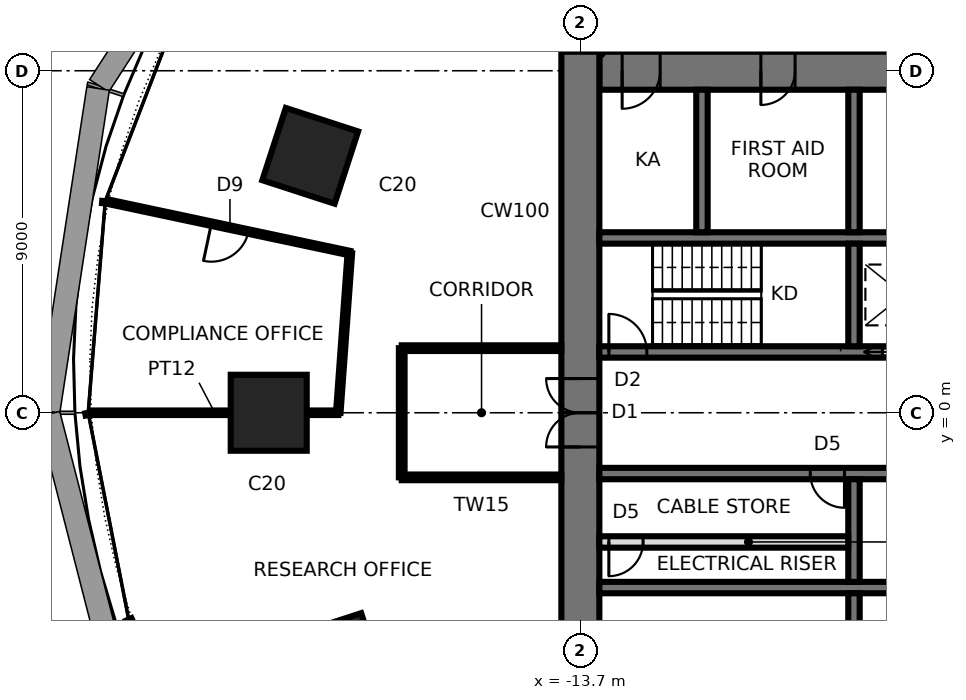
"""IFC4 building model, lengths in metres.
Left out: names, types, materials, properties, quantities, classifications, styles, units other than length and angle.
Written with IfcOpenShell. Run it as: python <this file> out.ifc"""

import sys

from ifc_helpers import new_model, si_unit, direction, frame, frame_2d, origin, origin_2d, place, context, subcontext, project, spatial, rectangle, extrude, element, fill, save


model = new_model("IFC4")
c1 = context("Model", 3, precision=1e-05, world=origin(), true_north=direction((0.0, 1.0)))
c2 = subcontext(c1, "Body", "Model", "MODEL_VIEW")
j1 = project(units=[si_unit("LENGTHUNIT", "METRE"), si_unit("PLANEANGLEUNIT", "RADIAN")], contexts=[c1])
p1 = place(None, origin())
s1 = spatial("IfcSite", under=j1, at=p1, CompositionType="ELEMENT")
p2 = place(p1, origin())
s2 = spatial("IfcBuilding", under=s1, at=p2, CompositionType="ELEMENT")
p3 = place(p2, frame((0.0, 0.0, 57.4)))
s3 = spatial("IfcBuildingStorey", under=s2, at=p3, CompositionType="ELEMENT", Elevation=57.4)
for number, where, z_axis, x_axis in (
    (1, (-20.808, 6.761, 0.0), (0.0, 0.0, 1.0), (-0.951, 0.309, 0.0)),
    (2, (-21.9, 0.0, 0.0), (0.0, 0.0, 1.0), (-1.0, 0.0, 0.0)),
    (3, (-20.109, -6.534, 0.0), (0.0, 0.0, 1.0), (-0.951, -0.309, 0.0)),
):
    element("IfcColumn", number, at=place(p3, frame(where, z_axis=z_axis, x_axis=x_axis)), inside=s3, PredefinedType="COLUMN", context=c2, shape_type="SweptSolid", body=[
        extrude(rectangle(XDim=2.0, YDim=2.0, at=origin_2d()), origin(), (0.0, 0.0, 1.0), 4.2),
    ])
p4 = place(p3, frame((13.2, 9.0, 0.0), z_axis=(0.0, 0.0, 1.0), x_axis=(-1.0, 0.0, 0.0)))
e4 = element("IfcWall", 4, at=p4, inside=s3, PredefinedType="SHEAR", context=c2, shape_type="SweptSolid", body=[
    extrude(rectangle(XDim=26.4, YDim=1.0, at=frame_2d((13.2, 0.0))), origin(), (0.0, 0.0, 1.0), 4.2),
])
p5 = place(p4, frame((2.65, 0.0, 0.0)))
e5 = element("IfcOpeningElement", 5, at=p5, cuts=e4, PredefinedType="OPENING", context=c2, shape_type="SweptSolid", body=[
    extrude(rectangle(XDim=0.9, YDim=2.1, at=frame_2d((0.45, 1.05))), frame((0.0, 0.51, 0.0), z_axis=(0.0, -1.0, 0.0), x_axis=(1.0, 0.0, 0.0)), (0.0, 0.0, 1.0), 1.02),
])
p6 = place(p4, frame((9.5, 0.0, 0.0)))
e6 = element("IfcOpeningElement", 6, at=p6, cuts=e4, PredefinedType="OPENING", context=c2, shape_type="SweptSolid", body=[
    extrude(rectangle(XDim=0.9, YDim=2.1, at=frame_2d((0.45, 1.05))), frame((0.0, 0.51, 0.0), z_axis=(0.0, -1.0, 0.0), x_axis=(1.0, 0.0, 0.0)), (0.0, 0.0, 1.0), 1.02),
])
p7 = place(p4, frame((16.0, 0.0, 0.0)))
e7 = element("IfcOpeningElement", 7, at=p7, cuts=e4, PredefinedType="OPENING", context=c2, shape_type="SweptSolid", body=[
    extrude(rectangle(XDim=0.9, YDim=2.1, at=frame_2d((0.45, 1.05))), frame((0.0, 0.51, 0.0), z_axis=(0.0, -1.0, 0.0), x_axis=(1.0, 0.0, 0.0)), (0.0, 0.0, 1.0), 1.02),
])
p8 = place(p4, frame((21.25, 0.0, 0.0)))
e8 = element("IfcOpeningElement", 8, at=p8, cuts=e4, PredefinedType="OPENING", context=c2, shape_type="SweptSolid", body=[
    extrude(rectangle(XDim=0.9, YDim=2.1, at=frame_2d((0.45, 1.05))), frame((0.0, 0.51, 0.0), z_axis=(0.0, -1.0, 0.0), x_axis=(1.0, 0.0, 0.0)), (0.0, 0.0, 1.0), 1.02),
])
p9 = place(p4, frame((24.8, 0.0, 0.0)))
e9 = element("IfcOpeningElement", 9, at=p9, cuts=e4, PredefinedType="OPENING", context=c2, shape_type="SweptSolid", body=[
    extrude(rectangle(XDim=1.0, YDim=2.1, at=frame_2d((0.5, 1.05))), frame((0.0, 0.51, 0.0), z_axis=(0.0, -1.0, 0.0), x_axis=(1.0, 0.0, 0.0)), (0.0, 0.0, 1.0), 1.02),
])
p10 = place(p3, frame((-13.7, 9.5, 0.0), z_axis=(0.0, 0.0, 1.0), x_axis=(0.0, -1.0, 0.0)))
e10 = element("IfcWall", 10, at=p10, inside=s3, PredefinedType="SHEAR", context=c2, shape_type="SweptSolid", body=[
    extrude(rectangle(XDim=19.0, YDim=1.0, at=frame_2d((9.5, 0.0))), origin(), (0.0, 0.0, 1.0), 4.2),
])
p11 = place(p10, frame((8.6, 0.0, 0.0)))
e11 = element("IfcOpeningElement", 11, at=p11, cuts=e10, PredefinedType="OPENING", context=c2, shape_type="SweptSolid", body=[
    extrude(rectangle(XDim=1.8, YDim=2.4, at=frame_2d((0.9, 1.2))), frame((0.0, 0.51, 0.0), z_axis=(0.0, -1.0, 0.0), x_axis=(1.0, 0.0, 0.0)), (0.0, 0.0, 1.0), 1.02),
])
p12 = place(p3, frame((-13.2, 1.6, 0.0), z_axis=(0.0, 0.0, 1.0), x_axis=(1.0, 0.0, 0.0)))
e12 = element("IfcWall", 12, at=p12, inside=s3, PredefinedType="SHEAR", context=c2, shape_type="SweptSolid", body=[
    extrude(rectangle(XDim=26.4, YDim=0.3, at=frame_2d((13.2, 0.0))), origin(), (0.0, 0.0, 1.0), 4.2),
])
p13 = place(p12, frame((0.25, 0.0, 0.0)))
e13 = element("IfcOpeningElement", 13, at=p13, cuts=e12, PredefinedType="OPENING", context=c2, shape_type="SweptSolid", body=[
    extrude(rectangle(XDim=1.0, YDim=2.1, at=frame_2d((0.5, 1.05))), frame((0.0, 0.16, 0.0), z_axis=(0.0, -1.0, 0.0), x_axis=(1.0, 0.0, 0.0)), (0.0, 0.0, 1.0), 0.32),
])
p14 = place(p12, frame((20.25, 0.0, 0.0)))
e14 = element("IfcOpeningElement", 14, at=p14, cuts=e12, PredefinedType="OPENING", context=c2, shape_type="SweptSolid", body=[
    extrude(rectangle(XDim=1.5, YDim=2.4, at=frame_2d((0.75, 1.2))), frame((0.0, 0.16, 0.0), z_axis=(0.0, -1.0, 0.0), x_axis=(1.0, 0.0, 0.0)), (0.0, 0.0, 1.0), 0.32),
])
p15 = place(p12, frame((7.45, 0.0, 0.0)))
e15 = element("IfcOpeningElement", 15, at=p15, cuts=e12, PredefinedType="OPENING", context=c2, shape_type="SweptSolid", body=[
    extrude(rectangle(XDim=1.1, YDim=2.3, at=frame_2d((0.55, 1.15))), frame((0.0, 0.16, 0.0), z_axis=(0.0, -1.0, 0.0), x_axis=(1.0, 0.0, 0.0)), (0.0, 0.0, 1.0), 0.32),
])
p16 = place(p12, frame((10.05, 0.0, 0.0)))
e16 = element("IfcOpeningElement", 16, at=p16, cuts=e12, PredefinedType="OPENING", context=c2, shape_type="SweptSolid", body=[
    extrude(rectangle(XDim=1.1, YDim=2.3, at=frame_2d((0.55, 1.15))), frame((0.0, 0.16, 0.0), z_axis=(0.0, -1.0, 0.0), x_axis=(1.0, 0.0, 0.0)), (0.0, 0.0, 1.0), 0.32),
])
p17 = place(p12, frame((12.65, 0.0, 0.0)))
e17 = element("IfcOpeningElement", 17, at=p17, cuts=e12, PredefinedType="OPENING", context=c2, shape_type="SweptSolid", body=[
    extrude(rectangle(XDim=1.1, YDim=2.3, at=frame_2d((0.55, 1.15))), frame((0.0, 0.16, 0.0), z_axis=(0.0, -1.0, 0.0), x_axis=(1.0, 0.0, 0.0)), (0.0, 0.0, 1.0), 0.32),
])
p18 = place(p12, frame((24.15, 0.0, 0.0)))
e18 = element("IfcOpeningElement", 18, at=p18, cuts=e12, PredefinedType="OPENING", context=c2, shape_type="SweptSolid", body=[
    extrude(rectangle(XDim=0.9, YDim=2.1, at=frame_2d((0.45, 1.05))), frame((0.0, 0.16, 0.0), z_axis=(0.0, -1.0, 0.0), x_axis=(1.0, 0.0, 0.0)), (0.0, 0.0, 1.0), 0.32),
])
p19 = place(p3, frame((-13.2, -1.6, 0.0), z_axis=(0.0, 0.0, 1.0), x_axis=(1.0, 0.0, 0.0)))
e19 = element("IfcWall", 19, at=p19, inside=s3, PredefinedType="SHEAR", context=c2, shape_type="SweptSolid", body=[
    extrude(rectangle(XDim=26.4, YDim=0.3, at=frame_2d((13.2, 0.0))), origin(), (0.0, 0.0, 1.0), 4.2),
])
p20 = place(p19, frame((25.15, 0.0, 0.0)))
e20 = element("IfcOpeningElement", 20, at=p20, cuts=e19, PredefinedType="OPENING", context=c2, shape_type="SweptSolid", body=[
    extrude(rectangle(XDim=1.0, YDim=2.1, at=frame_2d((0.5, 1.05))), frame((0.0, 0.16, 0.0), z_axis=(0.0, -1.0, 0.0), x_axis=(1.0, 0.0, 0.0)), (0.0, 0.0, 1.0), 0.32),
])
p21 = place(p19, frame((15.25, 0.0, 0.0)))
e21 = element("IfcOpeningElement", 21, at=p21, cuts=e19, PredefinedType="OPENING", context=c2, shape_type="SweptSolid", body=[
    extrude(rectangle(XDim=1.1, YDim=2.3, at=frame_2d((0.55, 1.15))), frame((0.0, 0.16, 0.0), z_axis=(0.0, -1.0, 0.0), x_axis=(1.0, 0.0, 0.0)), (0.0, 0.0, 1.0), 0.32),
])
p22 = place(p19, frame((17.85, 0.0, 0.0)))
e22 = element("IfcOpeningElement", 22, at=p22, cuts=e19, PredefinedType="OPENING", context=c2, shape_type="SweptSolid", body=[
    extrude(rectangle(XDim=1.1, YDim=2.3, at=frame_2d((0.55, 1.15))), frame((0.0, 0.16, 0.0), z_axis=(0.0, -1.0, 0.0), x_axis=(1.0, 0.0, 0.0)), (0.0, 0.0, 1.0), 0.32),
])
p23 = place(p19, frame((5.55, 0.0, 0.0)))
e23 = element("IfcOpeningElement", 23, at=p23, cuts=e19, PredefinedType="OPENING", context=c2, shape_type="SweptSolid", body=[
    extrude(rectangle(XDim=0.9, YDim=2.1, at=frame_2d((0.45, 1.05))), frame((0.0, 0.16, 0.0), z_axis=(0.0, -1.0, 0.0), x_axis=(1.0, 0.0, 0.0)), (0.0, 0.0, 1.0), 0.32),
])
for number, where, z_axis, x_axis in (
    (24, (-13.2, 4.6, 0.0), (0.0, 0.0, 1.0), (1.0, 0.0, 0.0)),
    (25, (-13.2, -4.6, 0.0), (0.0, 0.0, 1.0), (1.0, 0.0, 0.0)),
):
    element("IfcWall", number, at=place(p3, frame(where, z_axis=z_axis, x_axis=x_axis)), inside=s3, PredefinedType="SHEAR", context=c2, shape_type="SweptSolid", body=[
        extrude(rectangle(XDim=26.4, YDim=0.3, at=frame_2d((13.2, 0.0))), origin(), (0.0, 0.0, 1.0), 4.2),
    ])
p24 = place(p3, frame((-6.5, 1.75, 0.0), z_axis=(0.0, 0.0, 1.0), x_axis=(0.0, 1.0, 0.0)))
e26 = element("IfcWall", 26, at=p24, inside=s3, PredefinedType="SHEAR", context=c2, shape_type="SweptSolid", body=[
    extrude(rectangle(XDim=2.7, YDim=0.3, at=frame_2d((1.35, 0.0))), origin(), (0.0, 0.0, 1.0), 4.2),
])
p25 = place(p3, frame((-6.5, 4.75, 0.0), z_axis=(0.0, 0.0, 1.0), x_axis=(0.0, 1.0, 0.0)))
e27 = element("IfcWall", 27, at=p25, inside=s3, PredefinedType="SHEAR", context=c2, shape_type="SweptSolid", body=[
    extrude(rectangle(XDim=3.75, YDim=0.3, at=frame_2d((1.875, 0.0))), origin(), (0.0, 0.0, 1.0), 4.2),
])
p26 = place(p3, frame((-6.5, -1.75, 0.0), z_axis=(0.0, 0.0, 1.0), x_axis=(0.0, -1.0, 0.0)))
e28 = element("IfcWall", 28, at=p26, inside=s3, PredefinedType="SHEAR", context=c2, shape_type="SweptSolid", body=[
    extrude(rectangle(XDim=2.7, YDim=0.3, at=frame_2d((1.35, 0.0))), origin(), (0.0, 0.0, 1.0), 4.2),
])
for number, where, z_axis, x_axis in (
    (29, (-6.5, -4.75, 0.0), (0.0, 0.0, 1.0), (0.0, -1.0, 0.0)),
    (30, (-10.5, 4.75, 0.0), (0.0, 0.0, 1.0), (0.0, 1.0, 0.0)),
):
    element("IfcWall", number, at=place(p3, frame(where, z_axis=z_axis, x_axis=x_axis)), inside=s3, PredefinedType="SHEAR", context=c2, shape_type="SweptSolid", body=[
        extrude(rectangle(XDim=3.75, YDim=0.3, at=frame_2d((1.875, 0.0))), origin(), (0.0, 0.0, 1.0), 4.2),
    ])
p27 = place(p3, frame((-13.2, -3.4, 0.0), z_axis=(0.0, 0.0, 1.0), x_axis=(1.0, 0.0, 0.0)))
e31 = element("IfcWall", 31, at=p27, inside=s3, PredefinedType="SOLIDWALL", context=c2, shape_type="SweptSolid", body=[
    extrude(rectangle(XDim=6.55, YDim=0.3, at=frame_2d((3.275, 0.0))), origin(), (0.0, 0.0, 1.0), 4.04),
])
p28 = place(p27, frame((0.25, 0.0, 0.0)))
e32 = element("IfcOpeningElement", 32, at=p28, cuts=e31, PredefinedType="OPENING", context=c2, shape_type="SweptSolid", body=[
    extrude(rectangle(XDim=0.9, YDim=2.1, at=frame_2d((0.45, 1.05))), frame((0.0, 0.16, 0.0), z_axis=(0.0, -1.0, 0.0), x_axis=(1.0, 0.0, 0.0)), (0.0, 0.0, 1.0), 0.32),
])
p29 = place(p3, frame((-18.4, -1.7, 0.0), z_axis=(0.0, 0.0, 1.0), x_axis=(1.0, 0.0, 0.0)))
e33 = element("IfcWall", 33, at=p29, inside=s3, PredefinedType="PARTITIONING", context=c2, shape_type="SweptSolid", body=[
    extrude(rectangle(XDim=4.2, YDim=0.15, at=frame_2d((2.1, 0.0))), origin(), (0.0, 0.0, 1.0), 4.04),
])
p30 = place(p3, frame((-13.076, 9.5, 0.0), z_axis=(0.0, 0.0, 1.0), x_axis=(-0.809017564037, 0.587784468219, 0.0)))
e34 = element("IfcWall", 34, at=p30, inside=s3, PredefinedType="PARTITIONING", context=c2, shape_type="SweptSolid", body=[
    extrude(rectangle(XDim=9.561, YDim=0.12, at=frame_2d((4.781, 0.0))), origin(), (0.0, 0.0, 1.0), 2.84),
])
p31 = place(p30, frame((2.803, 0.0, 0.0)))
e35 = element("IfcOpeningElement", 35, at=p31, cuts=e34, PredefinedType="OPENING", context=c2, shape_type="SweptSolid", body=[
    extrude(rectangle(XDim=1.0, YDim=2.4, at=frame_2d((0.5, 1.2))), frame((0.0, 0.07, 0.0), z_axis=(0.0, -1.0, 0.0), x_axis=(1.0, 0.0, 0.0)), (0.0, 0.0, 1.0), 0.14),
])
p32 = place(p3, frame((-19.765, 4.201, 0.0), z_axis=(0.0, 0.0, 1.0), x_axis=(-0.978143001923, 0.207933325345, 0.0)))
e36 = element("IfcWall", 36, at=p32, inside=s3, PredefinedType="PARTITIONING", context=c2, shape_type="SweptSolid", body=[
    extrude(rectangle(XDim=6.5, YDim=0.12, at=frame_2d((3.25, 0.0))), origin(), (0.0, 0.0, 1.0), 4.04),
])
p33 = place(p32, frame((2.725, 0.0, 0.0)))
e37 = element("IfcOpeningElement", 37, at=p33, cuts=e36, PredefinedType="OPENING", context=c2, shape_type="SweptSolid", body=[
    extrude(rectangle(XDim=1.0, YDim=2.4, at=frame_2d((0.5, 1.2))), frame((0.0, 0.07, 0.0), z_axis=(0.0, -1.0, 0.0), x_axis=(1.0, 0.0, 0.0)), (0.0, 0.0, 1.0), 0.14),
])
p34 = place(p3, frame((-20.07, 0.0, 0.0), z_axis=(0.0, 0.0, 1.0), x_axis=(0.072334424812, 0.997380434432, 0.0)))
e38 = element("IfcWall", 38, at=p34, inside=s3, PredefinedType="PARTITIONING", context=c2, shape_type="SweptSolid", body=[
    extrude(rectangle(XDim=4.212, YDim=0.12, at=frame_2d((2.106, 0.0))), origin(), (0.0, 0.0, 1.0), 4.04),
])
p35 = place(p3, frame((-14.2, 1.7, 0.0), z_axis=(0.0, 0.0, 1.0), x_axis=(-1.0, 0.0, 0.0)))
e39 = element("IfcWall", 39, at=p35, inside=s3, PredefinedType="PARTITIONING", context=c2, shape_type="SweptSolid", body=[
    extrude(rectangle(XDim=4.2, YDim=0.15, at=frame_2d((2.1, 0.0))), origin(), (0.0, 0.0, 1.0), 4.04),
])
p36 = place(p3, frame((-26.57, 0.0, 0.0), z_axis=(0.0, 0.0, 1.0), x_axis=(1.0, 0.0, 0.0)))
e40 = element("IfcWall", 40, at=p36, inside=s3, PredefinedType="PARTITIONING", context=c2, shape_type="SweptSolid", body=[
    extrude(rectangle(XDim=6.5, YDim=0.12, at=frame_2d((3.25, 0.0))), origin(), (0.0, 0.0, 1.0), 2.84),
])
p37 = place(p3, frame((-18.4, 1.7, 0.0), z_axis=(0.0, 0.0, 1.0), x_axis=(0.0, -1.0, 0.0)))
e41 = element("IfcWall", 41, at=p37, inside=s3, PredefinedType="PARTITIONING", context=c2, shape_type="SweptSolid", body=[
    extrude(rectangle(XDim=3.4, YDim=0.15, at=frame_2d((1.7, 0.0))), origin(), (0.0, 0.0, 1.0), 4.04),
])
p38 = place(p11, frame((1.8, 0.0, 0.0), z_axis=(0.0, 0.0, 1.0), x_axis=(-1.0, 0.0, 0.0)))
e42 = element("IfcDoor", 42, at=p38, inside=s3, OperationType="DOUBLE_DOOR_SINGLE_SWING", PredefinedType="DOOR", context=c2, shape_type="SweptSolid", body=[
    extrude(rectangle(XDim=1.72, YDim=2.36, at=frame_2d((0.9, 1.18))), frame((0.0, 0.025, 0.0), z_axis=(0.0, -1.0, 0.0), x_axis=(1.0, 0.0, 0.0)), (0.0, 0.0, 1.0), 0.05),
    extrude(rectangle(XDim=0.04, YDim=2.4, at=frame_2d((1.78, 1.2))), frame((0.0, 0.25, 0.0), z_axis=(0.0, -1.0, 0.0), x_axis=(1.0, 0.0, 0.0)), (0.0, 0.0, 1.0), 0.5),
    extrude(rectangle(XDim=0.04, YDim=2.4, at=frame_2d((0.02, 1.2))), frame((0.0, 0.25, 0.0), z_axis=(0.0, -1.0, 0.0), x_axis=(1.0, 0.0, 0.0)), (0.0, 0.0, 1.0), 0.5),
    extrude(rectangle(XDim=1.72, YDim=0.04, at=frame_2d((0.9, 2.38))), frame((0.0, 0.25, 0.0), z_axis=(0.0, -1.0, 0.0), x_axis=(1.0, 0.0, 0.0)), (0.0, 0.0, 1.0), 0.5),
])
fill(e11, e42)
p39 = place(p13, origin())
e43 = element("IfcDoor", 43, at=p39, inside=s3, OperationType="SINGLE_SWING_LEFT", PredefinedType="DOOR", context=c2, shape_type="SweptSolid", body=[
    extrude(rectangle(XDim=1.0, YDim=2.1, at=frame_2d((0.5, 1.05))), frame((0.0, 0.025, 0.0), z_axis=(0.0, -1.0, 0.0), x_axis=(1.0, 0.0, 0.0)), (0.0, 0.0, 1.0), 0.05),
])
fill(e13, e43)
p40 = place(p15, origin())
e44 = element("IfcDoor", 44, at=p40, inside=s3, OperationType="SLIDING_TO_LEFT", PredefinedType="DOOR", context=c2, shape_type="SweptSolid", body=[
    extrude(rectangle(XDim=1.1, YDim=2.3, at=frame_2d((0.55, 1.15))), frame((0.0, 0.025, 0.0), z_axis=(0.0, -1.0, 0.0), x_axis=(1.0, 0.0, 0.0)), (0.0, 0.0, 1.0), 0.05),
])
fill(e15, e44)
p41 = place(p23, frame((0.9, 0.0, 0.0), z_axis=(0.0, 0.0, 1.0), x_axis=(-1.0, 0.0, 0.0)))
e45 = element("IfcDoor", 45, at=p41, inside=s3, OperationType="SINGLE_SWING_LEFT", PredefinedType="DOOR", context=c2, shape_type="SweptSolid", body=[
    extrude(rectangle(XDim=0.9, YDim=2.1, at=frame_2d((0.45, 1.05))), frame((0.0, 0.025, 0.0), z_axis=(0.0, -1.0, 0.0), x_axis=(1.0, 0.0, 0.0)), (0.0, 0.0, 1.0), 0.05),
])
fill(e23, e45)
p42 = place(p8, origin())
e46 = element("IfcDoor", 46, at=p42, inside=s3, OperationType="SINGLE_SWING_RIGHT", PredefinedType="DOOR", context=c2, shape_type="SweptSolid", body=[
    extrude(rectangle(XDim=0.82, YDim=2.06, at=frame_2d((0.45, 1.03))), frame((0.0, 0.025, 0.0), z_axis=(0.0, -1.0, 0.0), x_axis=(1.0, 0.0, 0.0)), (0.0, 0.0, 1.0), 0.05),
    extrude(rectangle(XDim=0.04, YDim=2.1, at=frame_2d((0.02, 1.05))), frame((0.0, 0.25, 0.0), z_axis=(0.0, -1.0, 0.0), x_axis=(1.0, 0.0, 0.0)), (0.0, 0.0, 1.0), 0.5),
    extrude(rectangle(XDim=0.04, YDim=2.1, at=frame_2d((0.88, 1.05))), frame((0.0, 0.25, 0.0), z_axis=(0.0, -1.0, 0.0), x_axis=(1.0, 0.0, 0.0)), (0.0, 0.0, 1.0), 0.5),
    extrude(rectangle(XDim=0.82, YDim=0.04, at=frame_2d((0.45, 2.08))), frame((0.0, 0.25, 0.0), z_axis=(0.0, -1.0, 0.0), x_axis=(1.0, 0.0, 0.0)), (0.0, 0.0, 1.0), 0.5),
])
fill(e8, e46)
p43 = place(p9, origin())
e47 = element("IfcDoor", 47, at=p43, inside=s3, OperationType="SINGLE_SWING_RIGHT", PredefinedType="DOOR", context=c2, shape_type="SweptSolid", body=[
    extrude(rectangle(XDim=0.92, YDim=2.06, at=frame_2d((0.5, 1.03))), frame((0.0, 0.025, 0.0), z_axis=(0.0, -1.0, 0.0), x_axis=(1.0, 0.0, 0.0)), (0.0, 0.0, 1.0), 0.05),
    extrude(rectangle(XDim=0.04, YDim=2.1, at=frame_2d((0.02, 1.05))), frame((0.0, 0.25, 0.0), z_axis=(0.0, -1.0, 0.0), x_axis=(1.0, 0.0, 0.0)), (0.0, 0.0, 1.0), 0.5),
    extrude(rectangle(XDim=0.04, YDim=2.1, at=frame_2d((0.98, 1.05))), frame((0.0, 0.25, 0.0), z_axis=(0.0, -1.0, 0.0), x_axis=(1.0, 0.0, 0.0)), (0.0, 0.0, 1.0), 0.5),
    extrude(rectangle(XDim=0.92, YDim=0.04, at=frame_2d((0.5, 2.08))), frame((0.0, 0.25, 0.0), z_axis=(0.0, -1.0, 0.0), x_axis=(1.0, 0.0, 0.0)), (0.0, 0.0, 1.0), 0.5),
])
fill(e9, e47)
p44 = place(p28, frame((0.9, 0.0, 0.0), z_axis=(0.0, 0.0, 1.0), x_axis=(-1.0, 0.0, 0.0)))
e48 = element("IfcDoor", 48, at=p44, inside=s3, OperationType="SINGLE_SWING_RIGHT", PredefinedType="DOOR", context=c2, shape_type="SweptSolid", body=[
    extrude(rectangle(XDim=0.9, YDim=2.1, at=frame_2d((0.45, 1.05))), frame((0.0, 0.025, 0.0), z_axis=(0.0, -1.0, 0.0), x_axis=(1.0, 0.0, 0.0)), (0.0, 0.0, 1.0), 0.05),
])
fill(e32, e48)
p45 = place(p33, origin())
e49 = element("IfcDoor", 49, at=p45, inside=s3, OperationType="SINGLE_SWING_RIGHT", PredefinedType="DOOR", context=c2, shape_type="SweptSolid", body=[
    extrude(rectangle(XDim=1.0, YDim=2.4, at=frame_2d((0.5, 1.2))), frame((0.0, 0.025, 0.0), z_axis=(0.0, -1.0, 0.0), x_axis=(1.0, 0.0, 0.0)), (0.0, 0.0, 1.0), 0.05),
])
fill(e37, e49)
save(model, sys.argv[1])
